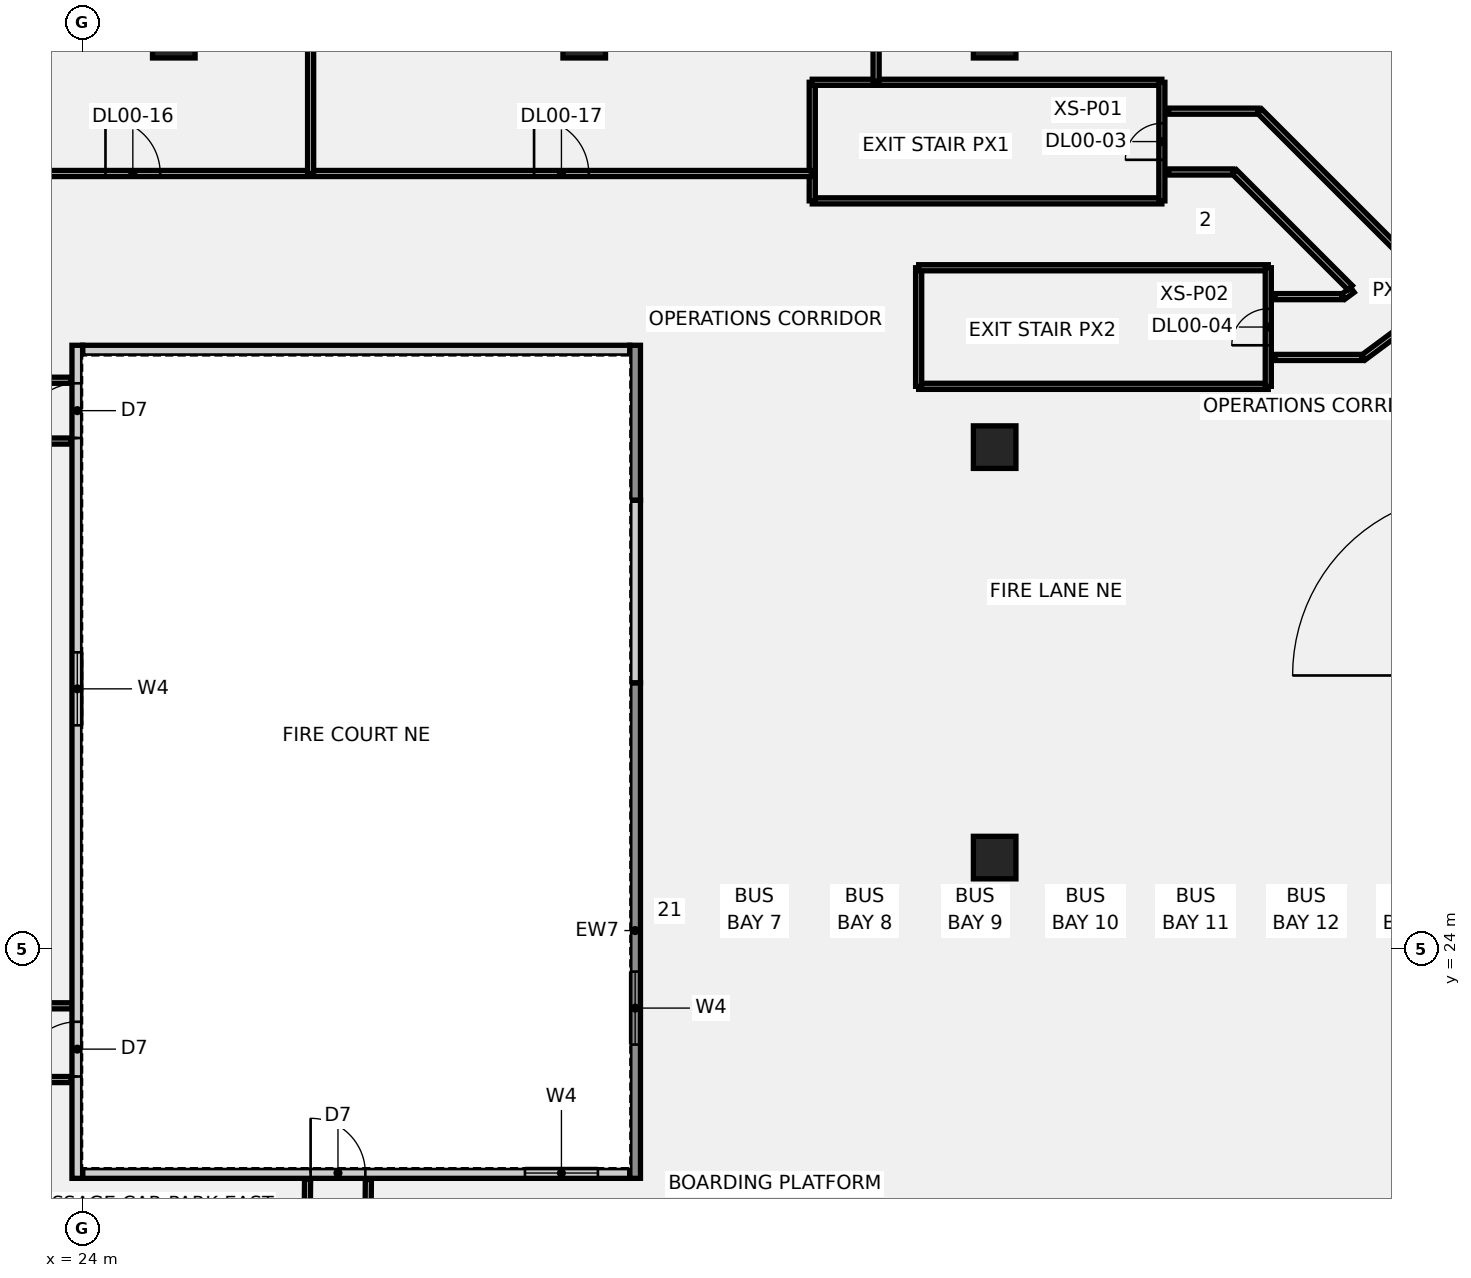
"""IFC4 building model, lengths in metres.
Left out: names, types, materials, properties, quantities, classifications, styles, units other than length and angle.
Written with IfcOpenShell. Run it as: python <this file> out.ifc"""

import sys

from ifc_helpers import new_model, si_unit, direction, frame, frame_2d, origin, origin_2d, place, context, subcontext, project, spatial, rectangle, extrude, element, fill, save


model = new_model("IFC4")
c1 = context("Model", 3, precision=1e-05, world=origin(), true_north=direction((0.0, 1.0)))
c2 = subcontext(c1, "Body", "Model", "MODEL_VIEW")
j1 = project(units=[si_unit("LENGTHUNIT", "METRE"), si_unit("PLANEANGLEUNIT", "RADIAN")], contexts=[c1])
p1 = place(None, origin())
s1 = spatial("IfcSite", under=j1, at=p1, CompositionType="ELEMENT")
p2 = place(p1, origin())
s2 = spatial("IfcBuilding", under=s1, at=p2, CompositionType="ELEMENT")
p3 = place(p2, origin())
s3 = spatial("IfcBuildingStorey", under=s2, at=p3, CompositionType="ELEMENT", Elevation=0.0)
for number, where, z_axis, x_axis in (
    (1, (27.0, 54.0, -0.55), (0.0, 0.0, 1.0), (1.0, 0.0, 0.0)),
    (2, (40.5, 54.0, -0.55), (0.0, 0.0, 1.0), (1.0, 0.0, 0.0)),
    (3, (54.0, 27.0, -0.55), (0.0, 0.0, 1.0), (1.0, 0.0, 0.0)),
    (4, (54.0, 40.5, -0.55), (0.0, 0.0, 1.0), (1.0, 0.0, 0.0)),
    (5, (54.0, 54.0, -0.55), (0.0, 0.0, 1.0), (1.0, 0.0, 0.0)),
):
    element("IfcColumn", number, at=place(p3, frame(where, z_axis=z_axis, x_axis=x_axis)), inside=s3, PredefinedType="COLUMN", context=c2, shape_type="SweptSolid", body=[
        extrude(rectangle(XDim=1.4, YDim=1.4, at=origin_2d()), origin(), (0.0, 0.0, 1.0), 9.05),
    ])
p4 = place(p3, frame((48.0, 48.6, 0.0), z_axis=(0.0, 0.0, 1.0), x_axis=(1.0, 0.0, 0.0)))
e6 = element("IfcWall", 6, at=p4, inside=s3, PredefinedType="PARTITIONING", context=c2, shape_type="SweptSolid", body=[
    extrude(rectangle(XDim=11.5, YDim=0.2, at=frame_2d((5.75, 0.0))), origin(), (0.0, 0.0, 1.0), 8.5),
])
p5 = place(p3, frame((48.0, 48.6, 0.0), z_axis=(0.0, 0.0, 1.0), x_axis=(0.0, 1.0, 0.0)))
e7 = element("IfcWall", 7, at=p5, inside=s3, PredefinedType="PARTITIONING", context=c2, shape_type="SweptSolid", body=[
    extrude(rectangle(XDim=3.9, YDim=0.2, at=frame_2d((1.95, 0.0))), origin(), (0.0, 0.0, 1.0), 8.5),
])
p6 = place(p3, frame((48.0, 52.5, 0.0), z_axis=(0.0, 0.0, 1.0), x_axis=(1.0, 0.0, 0.0)))
e8 = element("IfcWall", 8, at=p6, inside=s3, PredefinedType="PARTITIONING", context=c2, shape_type="SweptSolid", body=[
    extrude(rectangle(XDim=11.5, YDim=0.2, at=frame_2d((5.75, 0.0))), origin(), (0.0, 0.0, 1.0), 8.5),
])
p7 = place(p3, frame((59.5, 48.6, 0.0), z_axis=(0.0, 0.0, 1.0), x_axis=(0.0, 1.0, 0.0)))
e9 = element("IfcWall", 9, at=p7, inside=s3, PredefinedType="PARTITIONING", context=c2, shape_type="SweptSolid", body=[
    extrude(rectangle(XDim=3.9, YDim=0.2, at=frame_2d((1.95, 0.0))), origin(), (0.0, 0.0, 1.0), 8.5),
])
p8 = place(p7, frame((1.35, 0.0, 0.0)))
e10 = element("IfcOpeningElement", 10, at=p8, cuts=e9, PredefinedType="OPENING", context=c2, shape_type="SweptSolid", body=[
    extrude(rectangle(XDim=1.2, YDim=2.1, at=frame_2d((0.6, 1.05))), frame((0.0, 0.11, 0.0), z_axis=(0.0, -1.0, 0.0), x_axis=(1.0, 0.0, 0.0)), (0.0, 0.0, 1.0), 0.22),
])
p9 = place(p3, frame((51.5, 42.5, 0.0), z_axis=(0.0, 0.0, 1.0), x_axis=(1.0, 0.0, 0.0)))
e11 = element("IfcWall", 11, at=p9, inside=s3, PredefinedType="PARTITIONING", context=c2, shape_type="SweptSolid", body=[
    extrude(rectangle(XDim=11.5, YDim=0.2, at=frame_2d((5.75, 0.0))), origin(), (0.0, 0.0, 1.0), 8.5),
])
p10 = place(p3, frame((51.5, 42.5, 0.0), z_axis=(0.0, 0.0, 1.0), x_axis=(0.0, 1.0, 0.0)))
e12 = element("IfcWall", 12, at=p10, inside=s3, PredefinedType="PARTITIONING", context=c2, shape_type="SweptSolid", body=[
    extrude(rectangle(XDim=3.9, YDim=0.2, at=frame_2d((1.95, 0.0))), origin(), (0.0, 0.0, 1.0), 8.5),
])
p11 = place(p3, frame((51.5, 46.4, 0.0), z_axis=(0.0, 0.0, 1.0), x_axis=(1.0, 0.0, 0.0)))
e13 = element("IfcWall", 13, at=p11, inside=s3, PredefinedType="PARTITIONING", context=c2, shape_type="SweptSolid", body=[
    extrude(rectangle(XDim=11.5, YDim=0.2, at=frame_2d((5.75, 0.0))), origin(), (0.0, 0.0, 1.0), 8.5),
])
p12 = place(p3, frame((63.0, 42.5, 0.0), z_axis=(0.0, 0.0, 1.0), x_axis=(0.0, 1.0, 0.0)))
e14 = element("IfcWall", 14, at=p12, inside=s3, PredefinedType="PARTITIONING", context=c2, shape_type="SweptSolid", body=[
    extrude(rectangle(XDim=3.9, YDim=0.2, at=frame_2d((1.95, 0.0))), origin(), (0.0, 0.0, 1.0), 8.5),
])
p13 = place(p12, frame((1.35, 0.0, 0.0)))
e15 = element("IfcOpeningElement", 15, at=p13, cuts=e14, PredefinedType="OPENING", context=c2, shape_type="SweptSolid", body=[
    extrude(rectangle(XDim=1.2, YDim=2.1, at=frame_2d((0.6, 1.05))), frame((0.0, 0.11, 0.0), z_axis=(0.0, -1.0, 0.0), x_axis=(1.0, 0.0, 0.0)), (0.0, 0.0, 1.0), 0.22),
])
p14 = place(p3, frame((19.53, 49.5, 0.0), z_axis=(0.0, 0.0, 1.0), x_axis=(1.0, 0.0, 0.0)))
e16 = element("IfcWall", 16, at=p14, inside=s3, PredefinedType="PARTITIONING", context=c2, shape_type="SweptSolid", body=[
    extrude(rectangle(XDim=28.44, YDim=0.2, at=frame_2d((14.22, 0.0))), origin(), (0.0, 0.0, 1.0), 8.5),
])
p15 = place(p14, frame((5.222, 0.0, 0.0)))
e17 = element("IfcOpeningElement", 17, at=p15, cuts=e16, PredefinedType="OPENING", context=c2, shape_type="SweptSolid", body=[
    extrude(rectangle(XDim=1.8, YDim=2.1, at=frame_2d((0.9, 1.05))), frame((0.0, 0.11, 0.0), z_axis=(0.0, -1.0, 0.0), x_axis=(1.0, 0.0, 0.0)), (0.0, 0.0, 1.0), 0.22),
])
p16 = place(p14, frame((19.32, 0.0, 0.0)))
e18 = element("IfcOpeningElement", 18, at=p16, cuts=e16, PredefinedType="OPENING", context=c2, shape_type="SweptSolid", body=[
    extrude(rectangle(XDim=1.8, YDim=2.1, at=frame_2d((0.9, 1.05))), frame((0.0, 0.11, 0.0), z_axis=(0.0, -1.0, 0.0), x_axis=(1.0, 0.0, 0.0)), (0.0, 0.0, 1.0), 0.22),
])
p17 = place(p3, frame((31.5, 49.5, 0.0), z_axis=(0.0, 0.0, 1.0), x_axis=(0.0, 1.0, 0.0)))
e19 = element("IfcWall", 19, at=p17, inside=s3, PredefinedType="PARTITIONING", context=c2, shape_type="SweptSolid", body=[
    extrude(rectangle(XDim=10.199, YDim=0.2, at=frame_2d((5.1, 0.0))), origin(), (0.0, 0.0, 1.0), 8.5),
])
p18 = place(p3, frame((50.1, 52.53, 0.0), z_axis=(0.0, 0.0, 1.0), x_axis=(0.0, 1.0, 0.0)))
e20 = element("IfcWall", 20, at=p18, inside=s3, PredefinedType="PARTITIONING", context=c2, shape_type="SweptSolid", body=[
    extrude(rectangle(XDim=7.169, YDim=0.2, at=frame_2d((3.584, 0.0))), origin(), (0.0, 0.0, 1.0), 8.5),
])
p19 = place(p18, frame((3.08, 0.0, 0.0)))
e21 = element("IfcOpeningElement", 21, at=p19, cuts=e20, PredefinedType="OPENING", context=c2, shape_type="SweptSolid", body=[
    extrude(rectangle(XDim=1.0, YDim=2.1, at=frame_2d((0.5, 1.05))), frame((0.0, 0.11, 0.0), z_axis=(0.0, -1.0, 0.0), x_axis=(1.0, 0.0, 0.0)), (0.0, 0.0, 1.0), 0.22),
])
p20 = place(p3, frame((31.302, 4.807, 0.0), z_axis=(0.0, 0.0, 1.0), x_axis=(0.008423893865, 0.999964518377, 0.0)))
e22 = element("IfcWall", 22, at=p20, inside=s3, PredefinedType="PARTITIONING", context=c2, shape_type="SweptSolid", body=[
    extrude(rectangle(XDim=11.622, YDim=0.2, at=frame_2d((5.811, 0.0))), origin(), (0.0, 0.0, 1.0), 8.5),
])
p21 = place(p3, frame((33.298, 4.293, 0.0), z_axis=(0.0, 0.0, 1.0), x_axis=(0.008420669246, 0.999964545536, 0.0)))
e23 = element("IfcWall", 23, at=p21, inside=s3, PredefinedType="PARTITIONING", context=c2, shape_type="SweptSolid", body=[
    extrude(rectangle(XDim=12.119, YDim=0.2, at=frame_2d((6.06, 0.0))), origin(), (0.0, 0.0, 1.0), 8.5),
])
p22 = place(p3, frame((19.0, 22.125, 0.0), z_axis=(0.0, 0.0, 1.0), x_axis=(1.0, 0.0, 0.0)))
e24 = element("IfcWall", 24, at=p22, inside=s3, PredefinedType="PARTITIONING", context=c2, shape_type="SweptSolid", body=[
    extrude(rectangle(XDim=4.65, YDim=0.2, at=frame_2d((2.325, 0.0))), origin(), (0.0, 0.0, 1.0), 8.5),
])
p23 = place(p3, frame((19.22, 19.7, 0.0), z_axis=(0.0, 0.0, 1.0), x_axis=(1.0, 0.0, 0.0)))
e25 = element("IfcWall", 25, at=p23, inside=s3, PredefinedType="PARTITIONING", context=c2, shape_type="SweptSolid", body=[
    extrude(rectangle(XDim=4.4, YDim=0.2, at=frame_2d((2.2, 0.0))), origin(), (0.0, 0.0, 1.0), 8.5),
])
p24 = place(p3, frame((63.22, 45.45, 0.0), z_axis=(0.0, 0.0, 1.0), x_axis=(1.0, 0.0, 0.0)))
e26 = element("IfcWall", 26, at=p24, inside=s3, PredefinedType="PARTITIONING", context=c2, shape_type="SweptSolid", body=[
    extrude(rectangle(XDim=2.199, YDim=0.2, at=frame_2d((1.1, 0.0))), origin(), (0.0, 0.0, 1.0), 8.5),
])
p25 = place(p3, frame((65.469, 45.45, 0.0), z_axis=(0.0, 0.0, 1.0), x_axis=(0.802680749931, 0.596408931599, 0.0)))
e27 = element("IfcWall", 27, at=p25, inside=s3, PredefinedType="PARTITIONING", context=c2, shape_type="SweptSolid", body=[
    extrude(rectangle(XDim=0.37, YDim=0.2, at=frame_2d((0.185, 0.0))), origin(), (0.0, 0.0, 1.0), 8.5),
])
p26 = place(p3, frame((63.22, 43.45, 0.0), z_axis=(0.0, 0.0, 1.0), x_axis=(1.0, 0.0, 0.0)))
e28 = element("IfcWall", 28, at=p26, inside=s3, PredefinedType="PARTITIONING", context=c2, shape_type="SweptSolid", body=[
    extrude(rectangle(XDim=2.861, YDim=0.2, at=frame_2d((1.43, 0.0))), origin(), (0.0, 0.0, 1.0), 8.5),
])
p27 = place(p3, frame((66.131, 43.45, 0.0), z_axis=(0.0, 0.0, 1.0), x_axis=(0.802731660779, 0.5963404068, 0.0)))
e29 = element("IfcWall", 29, at=p27, inside=s3, PredefinedType="PARTITIONING", context=c2, shape_type="SweptSolid", body=[
    extrude(rectangle(XDim=4.384, YDim=0.2, at=frame_2d((2.192, 0.0))), origin(), (0.0, 0.0, 1.0), 8.5),
])
p28 = place(p3, frame((21.432, 42.7, 0.0), z_axis=(0.0, 0.0, 1.0), x_axis=(1.0, 0.0, 0.0)))
e30 = element("IfcWall", 30, at=p28, inside=s3, PredefinedType="PARTITIONING", context=c2, shape_type="SweptSolid", body=[
    extrude(rectangle(XDim=2.188, YDim=0.2, at=frame_2d((1.094, 0.0))), origin(), (0.0, 0.0, 1.0), 8.5),
])
p29 = place(p3, frame((20.208, 40.7, 0.0), z_axis=(0.0, 0.0, 1.0), x_axis=(1.0, 0.0, 0.0)))
e31 = element("IfcWall", 31, at=p29, inside=s3, PredefinedType="PARTITIONING", context=c2, shape_type="SweptSolid", body=[
    extrude(rectangle(XDim=3.412, YDim=0.2, at=frame_2d((1.706, 0.0))), origin(), (0.0, 0.0, 1.0), 8.5),
])
p30 = place(p3, frame((59.72, 51.55, 0.0), z_axis=(0.0, 0.0, 1.0), x_axis=(1.0, 0.0, 0.0)))
e32 = element("IfcWall", 32, at=p30, inside=s3, PredefinedType="PARTITIONING", context=c2, shape_type="SweptSolid", body=[
    extrude(rectangle(XDim=2.944, YDim=0.2, at=frame_2d((1.472, 0.0))), origin(), (0.0, 0.0, 1.0), 8.5),
])
p31 = place(p3, frame((62.714, 51.55, 0.0), z_axis=(0.0, 0.0, 1.0), x_axis=(0.707236029221, -0.706977509523, 0.0)))
e33 = element("IfcWall", 33, at=p31, inside=s3, PredefinedType="PARTITIONING", context=c2, shape_type="SweptSolid", body=[
    extrude(rectangle(XDim=6.611, YDim=0.2, at=frame_2d((3.305, 0.0))), origin(), (0.0, 0.0, 1.0), 8.5),
])
p32 = place(p3, frame((59.72, 49.55, 0.0), z_axis=(0.0, 0.0, 1.0), x_axis=(1.0, 0.0, 0.0)))
e34 = element("IfcWall", 34, at=p32, inside=s3, PredefinedType="PARTITIONING", context=c2, shape_type="SweptSolid", body=[
    extrude(rectangle(XDim=2.116, YDim=0.2, at=frame_2d((1.058, 0.0))), origin(), (0.0, 0.0, 1.0), 8.5),
])
p33 = place(p3, frame((61.886, 49.55, 0.0), z_axis=(0.0, 0.0, 1.0), x_axis=(0.707220072345, -0.706993471874, 0.0)))
e35 = element("IfcWall", 35, at=p33, inside=s3, PredefinedType="PARTITIONING", context=c2, shape_type="SweptSolid", body=[
    extrude(rectangle(XDim=5.387, YDim=0.2, at=frame_2d((2.693, 0.0))), origin(), (0.0, 0.0, 1.0), 8.5),
])
p34 = place(p3, frame((24.0, 16.625, 0.0), z_axis=(0.0, 0.0, 1.0), x_axis=(1.0, 0.0, 0.0)))
e36 = element("IfcWall", 36, at=p34, inside=s3, PredefinedType="SOLIDWALL", context=c2, shape_type="SweptSolid", body=[
    extrude(rectangle(XDim=18.0, YDim=0.35, at=frame_2d((9.0, 0.0))), origin(), (0.0, 0.0, 1.0), 8.5),
])
p35 = place(p34, frame((7.5, 0.0, 0.0)))
e37 = element("IfcOpeningElement", 37, at=p35, cuts=e36, PredefinedType="OPENING", context=c2, shape_type="SweptSolid", body=[
    extrude(rectangle(XDim=1.8, YDim=2.4, at=frame_2d((0.9, 1.2))), frame((0.0, 0.185, 0.0), z_axis=(0.0, -1.0, 0.0), x_axis=(1.0, 0.0, 0.0)), (0.0, 0.0, 1.0), 0.37),
])
p36 = place(p34, frame((14.55, 0.0, 1.0)))
e38 = element("IfcOpeningElement", 38, at=p36, cuts=e36, PredefinedType="OPENING", context=c2, shape_type="SweptSolid", body=[
    extrude(rectangle(XDim=2.4, YDim=1.8, at=frame_2d((1.2, 0.9))), frame((0.0, 0.185, 0.0), z_axis=(0.0, -1.0, 0.0), x_axis=(1.0, 0.0, 0.0)), (0.0, 0.0, 1.0), 0.37),
])
p37 = place(p3, frame((24.0, 43.675, 0.0), z_axis=(0.0, 0.0, 1.0), x_axis=(1.0, 0.0, 0.0)))
e39 = element("IfcWall", 39, at=p37, inside=s3, PredefinedType="SOLIDWALL", context=c2, shape_type="SweptSolid", body=[
    extrude(rectangle(XDim=18.0, YDim=0.35, at=frame_2d((9.0, 0.0))), origin(), (0.0, 0.0, 1.0), 8.5),
])
p38 = place(p3, frame((23.825, 16.45, 0.0), z_axis=(0.0, 0.0, 1.0), x_axis=(0.0, 1.0, 0.0)))
e40 = element("IfcWall", 40, at=p38, inside=s3, PredefinedType="SOLIDWALL", context=c2, shape_type="SweptSolid", body=[
    extrude(rectangle(XDim=27.4, YDim=0.35, at=frame_2d((13.7, 0.0))), origin(), (0.0, 0.0, 1.0), 8.5),
])
p39 = place(p38, frame((3.35, 0.0, 0.0)))
e41 = element("IfcOpeningElement", 41, at=p39, cuts=e40, PredefinedType="OPENING", context=c2, shape_type="SweptSolid", body=[
    extrude(rectangle(XDim=1.8, YDim=2.4, at=frame_2d((0.9, 1.2))), frame((0.0, 0.185, 0.0), z_axis=(0.0, -1.0, 0.0), x_axis=(1.0, 0.0, 0.0)), (0.0, 0.0, 1.0), 0.37),
])
p40 = place(p38, frame((24.35, 0.0, 0.0)))
e42 = element("IfcOpeningElement", 42, at=p40, cuts=e40, PredefinedType="OPENING", context=c2, shape_type="SweptSolid", body=[
    extrude(rectangle(XDim=1.8, YDim=2.4, at=frame_2d((0.9, 1.2))), frame((0.0, 0.185, 0.0), z_axis=(0.0, -1.0, 0.0), x_axis=(1.0, 0.0, 0.0)), (0.0, 0.0, 1.0), 0.37),
])
p41 = place(p38, frame((14.9, 0.0, 1.0)))
e43 = element("IfcOpeningElement", 43, at=p41, cuts=e40, PredefinedType="OPENING", context=c2, shape_type="SweptSolid", body=[
    extrude(rectangle(XDim=2.4, YDim=1.8, at=frame_2d((1.2, 0.9))), frame((0.0, 0.185, 0.0), z_axis=(0.0, -1.0, 0.0), x_axis=(1.0, 0.0, 0.0)), (0.0, 0.0, 1.0), 0.37),
])
p42 = place(p3, frame((42.175, 16.45, 0.0), z_axis=(0.0, 0.0, 1.0), x_axis=(0.0, 1.0, 0.0)))
e44 = element("IfcWall", 44, at=p42, inside=s3, PredefinedType="SOLIDWALL", context=c2, shape_type="SweptSolid", body=[
    extrude(rectangle(XDim=16.3, YDim=0.35, at=frame_2d((8.15, 0.0))), origin(), (0.0, 0.0, 1.0), 8.5),
])
p43 = place(p42, frame((4.4, 0.0, 1.0)))
e45 = element("IfcOpeningElement", 45, at=p43, cuts=e44, PredefinedType="OPENING", context=c2, shape_type="SweptSolid", body=[
    extrude(rectangle(XDim=2.4, YDim=1.8, at=frame_2d((1.2, 0.9))), frame((0.0, 0.185, 0.0), z_axis=(0.0, -1.0, 0.0), x_axis=(1.0, 0.0, 0.0)), (0.0, 0.0, 1.0), 0.37),
])
p44 = place(p3, frame((42.175, 38.75, 0.0), z_axis=(0.0, 0.0, 1.0), x_axis=(0.0, 1.0, 0.0)))
e46 = element("IfcWall", 46, at=p44, inside=s3, PredefinedType="SOLIDWALL", context=c2, shape_type="SweptSolid", body=[
    extrude(rectangle(XDim=5.1, YDim=0.35, at=frame_2d((2.55, 0.0))), origin(), (0.0, 0.0, 1.0), 8.5),
])
p45 = place(p3, frame((42.175, 32.75, 4.9), z_axis=(0.0, 0.0, 1.0), x_axis=(0.0, 1.0, 0.0)))
e47 = element("IfcWall", 47, at=p45, inside=s3, PredefinedType="SOLIDWALL", context=c2, shape_type="SweptSolid", body=[
    extrude(rectangle(XDim=6.0, YDim=0.35, at=frame_2d((3.0, 0.0))), origin(), (0.0, 0.0, 1.0), 3.6),
])
p46 = place(p8, origin())
e48 = element("IfcDoor", 48, at=p46, inside=s3, OperationType="SINGLE_SWING_LEFT", PredefinedType="DOOR", context=c2, shape_type="SweptSolid", body=[
    extrude(rectangle(XDim=1.2, YDim=2.1, at=frame_2d((0.6, 1.05))), frame((0.0, 0.025, 0.0), z_axis=(0.0, -1.0, 0.0), x_axis=(1.0, 0.0, 0.0)), (0.0, 0.0, 1.0), 0.05),
])
fill(e10, e48)
p47 = place(p13, origin())
e49 = element("IfcDoor", 49, at=p47, inside=s3, OperationType="SINGLE_SWING_RIGHT", PredefinedType="DOOR", context=c2, shape_type="SweptSolid", body=[
    extrude(rectangle(XDim=1.2, YDim=2.1, at=frame_2d((0.6, 1.05))), frame((0.0, 0.025, 0.0), z_axis=(0.0, -1.0, 0.0), x_axis=(1.0, 0.0, 0.0)), (0.0, 0.0, 1.0), 0.05),
])
fill(e15, e49)
p48 = place(p15, origin())
e50 = element("IfcDoor", 50, at=p48, inside=s3, OperationType="SINGLE_SWING_RIGHT", PredefinedType="DOOR", context=c2, shape_type="SweptSolid", body=[
    extrude(rectangle(XDim=1.8, YDim=2.1, at=frame_2d((0.9, 1.05))), frame((0.0, 0.025, 0.0), z_axis=(0.0, -1.0, 0.0), x_axis=(1.0, 0.0, 0.0)), (0.0, 0.0, 1.0), 0.05),
])
fill(e17, e50)
p49 = place(p16, origin())
e51 = element("IfcDoor", 51, at=p49, inside=s3, OperationType="SINGLE_SWING_LEFT", PredefinedType="DOOR", context=c2, shape_type="SweptSolid", body=[
    extrude(rectangle(XDim=1.8, YDim=2.1, at=frame_2d((0.9, 1.05))), frame((0.0, 0.025, 0.0), z_axis=(0.0, -1.0, 0.0), x_axis=(1.0, 0.0, 0.0)), (0.0, 0.0, 1.0), 0.05),
])
fill(e18, e51)
p50 = place(p35, origin())
e52 = element("IfcDoor", 52, at=p50, inside=s3, OperationType="SINGLE_SWING_LEFT", PredefinedType="DOOR", context=c2, shape_type="SweptSolid", body=[
    extrude(rectangle(XDim=1.8, YDim=2.4, at=frame_2d((0.9, 1.2))), frame((0.0, 0.025, 0.0), z_axis=(0.0, -1.0, 0.0), x_axis=(1.0, 0.0, 0.0)), (0.0, 0.0, 1.0), 0.05),
])
fill(e37, e52)
p51 = place(p36, origin())
e53 = element("IfcWindow", 53, at=p51, inside=s3, PartitioningType="SINGLE_PANEL", PredefinedType="WINDOW", context=c2, shape_type="SweptSolid", body=[
    extrude(rectangle(XDim=2.4, YDim=1.8, at=frame_2d((1.2, 0.9))), frame((0.0, 0.03, 0.0), z_axis=(0.0, -1.0, 0.0), x_axis=(1.0, 0.0, 0.0)), (0.0, 0.0, 1.0), 0.06),
])
fill(e38, e53)
p52 = place(p39, frame((1.8, 0.0, 0.0), z_axis=(0.0, 0.0, 1.0), x_axis=(-1.0, 0.0, 0.0)))
e54 = element("IfcDoor", 54, at=p52, inside=s3, OperationType="SINGLE_SWING_LEFT", PredefinedType="DOOR", context=c2, shape_type="SweptSolid", body=[
    extrude(rectangle(XDim=1.8, YDim=2.4, at=frame_2d((0.9, 1.2))), frame((0.0, 0.025, 0.0), z_axis=(0.0, -1.0, 0.0), x_axis=(1.0, 0.0, 0.0)), (0.0, 0.0, 1.0), 0.05),
])
fill(e41, e54)
p53 = place(p40, frame((1.8, 0.0, 0.0), z_axis=(0.0, 0.0, 1.0), x_axis=(-1.0, 0.0, 0.0)))
e55 = element("IfcDoor", 55, at=p53, inside=s3, OperationType="SINGLE_SWING_LEFT", PredefinedType="DOOR", context=c2, shape_type="SweptSolid", body=[
    extrude(rectangle(XDim=1.8, YDim=2.4, at=frame_2d((0.9, 1.2))), frame((0.0, 0.025, 0.0), z_axis=(0.0, -1.0, 0.0), x_axis=(1.0, 0.0, 0.0)), (0.0, 0.0, 1.0), 0.05),
])
fill(e42, e55)
p54 = place(p41, origin())
e56 = element("IfcWindow", 56, at=p54, inside=s3, PartitioningType="SINGLE_PANEL", PredefinedType="WINDOW", context=c2, shape_type="SweptSolid", body=[
    extrude(rectangle(XDim=2.4, YDim=1.8, at=frame_2d((1.2, 0.9))), frame((0.0, 0.03, 0.0), z_axis=(0.0, -1.0, 0.0), x_axis=(1.0, 0.0, 0.0)), (0.0, 0.0, 1.0), 0.06),
])
fill(e43, e56)
p55 = place(p43, origin())
e57 = element("IfcWindow", 57, at=p55, inside=s3, PartitioningType="SINGLE_PANEL", PredefinedType="WINDOW", context=c2, shape_type="SweptSolid", body=[
    extrude(rectangle(XDim=2.4, YDim=1.8, at=frame_2d((1.2, 0.9))), frame((0.0, 0.03, 0.0), z_axis=(0.0, -1.0, 0.0), x_axis=(1.0, 0.0, 0.0)), (0.0, 0.0, 1.0), 0.06),
])
fill(e45, e57)
save(model, sys.argv[1])
